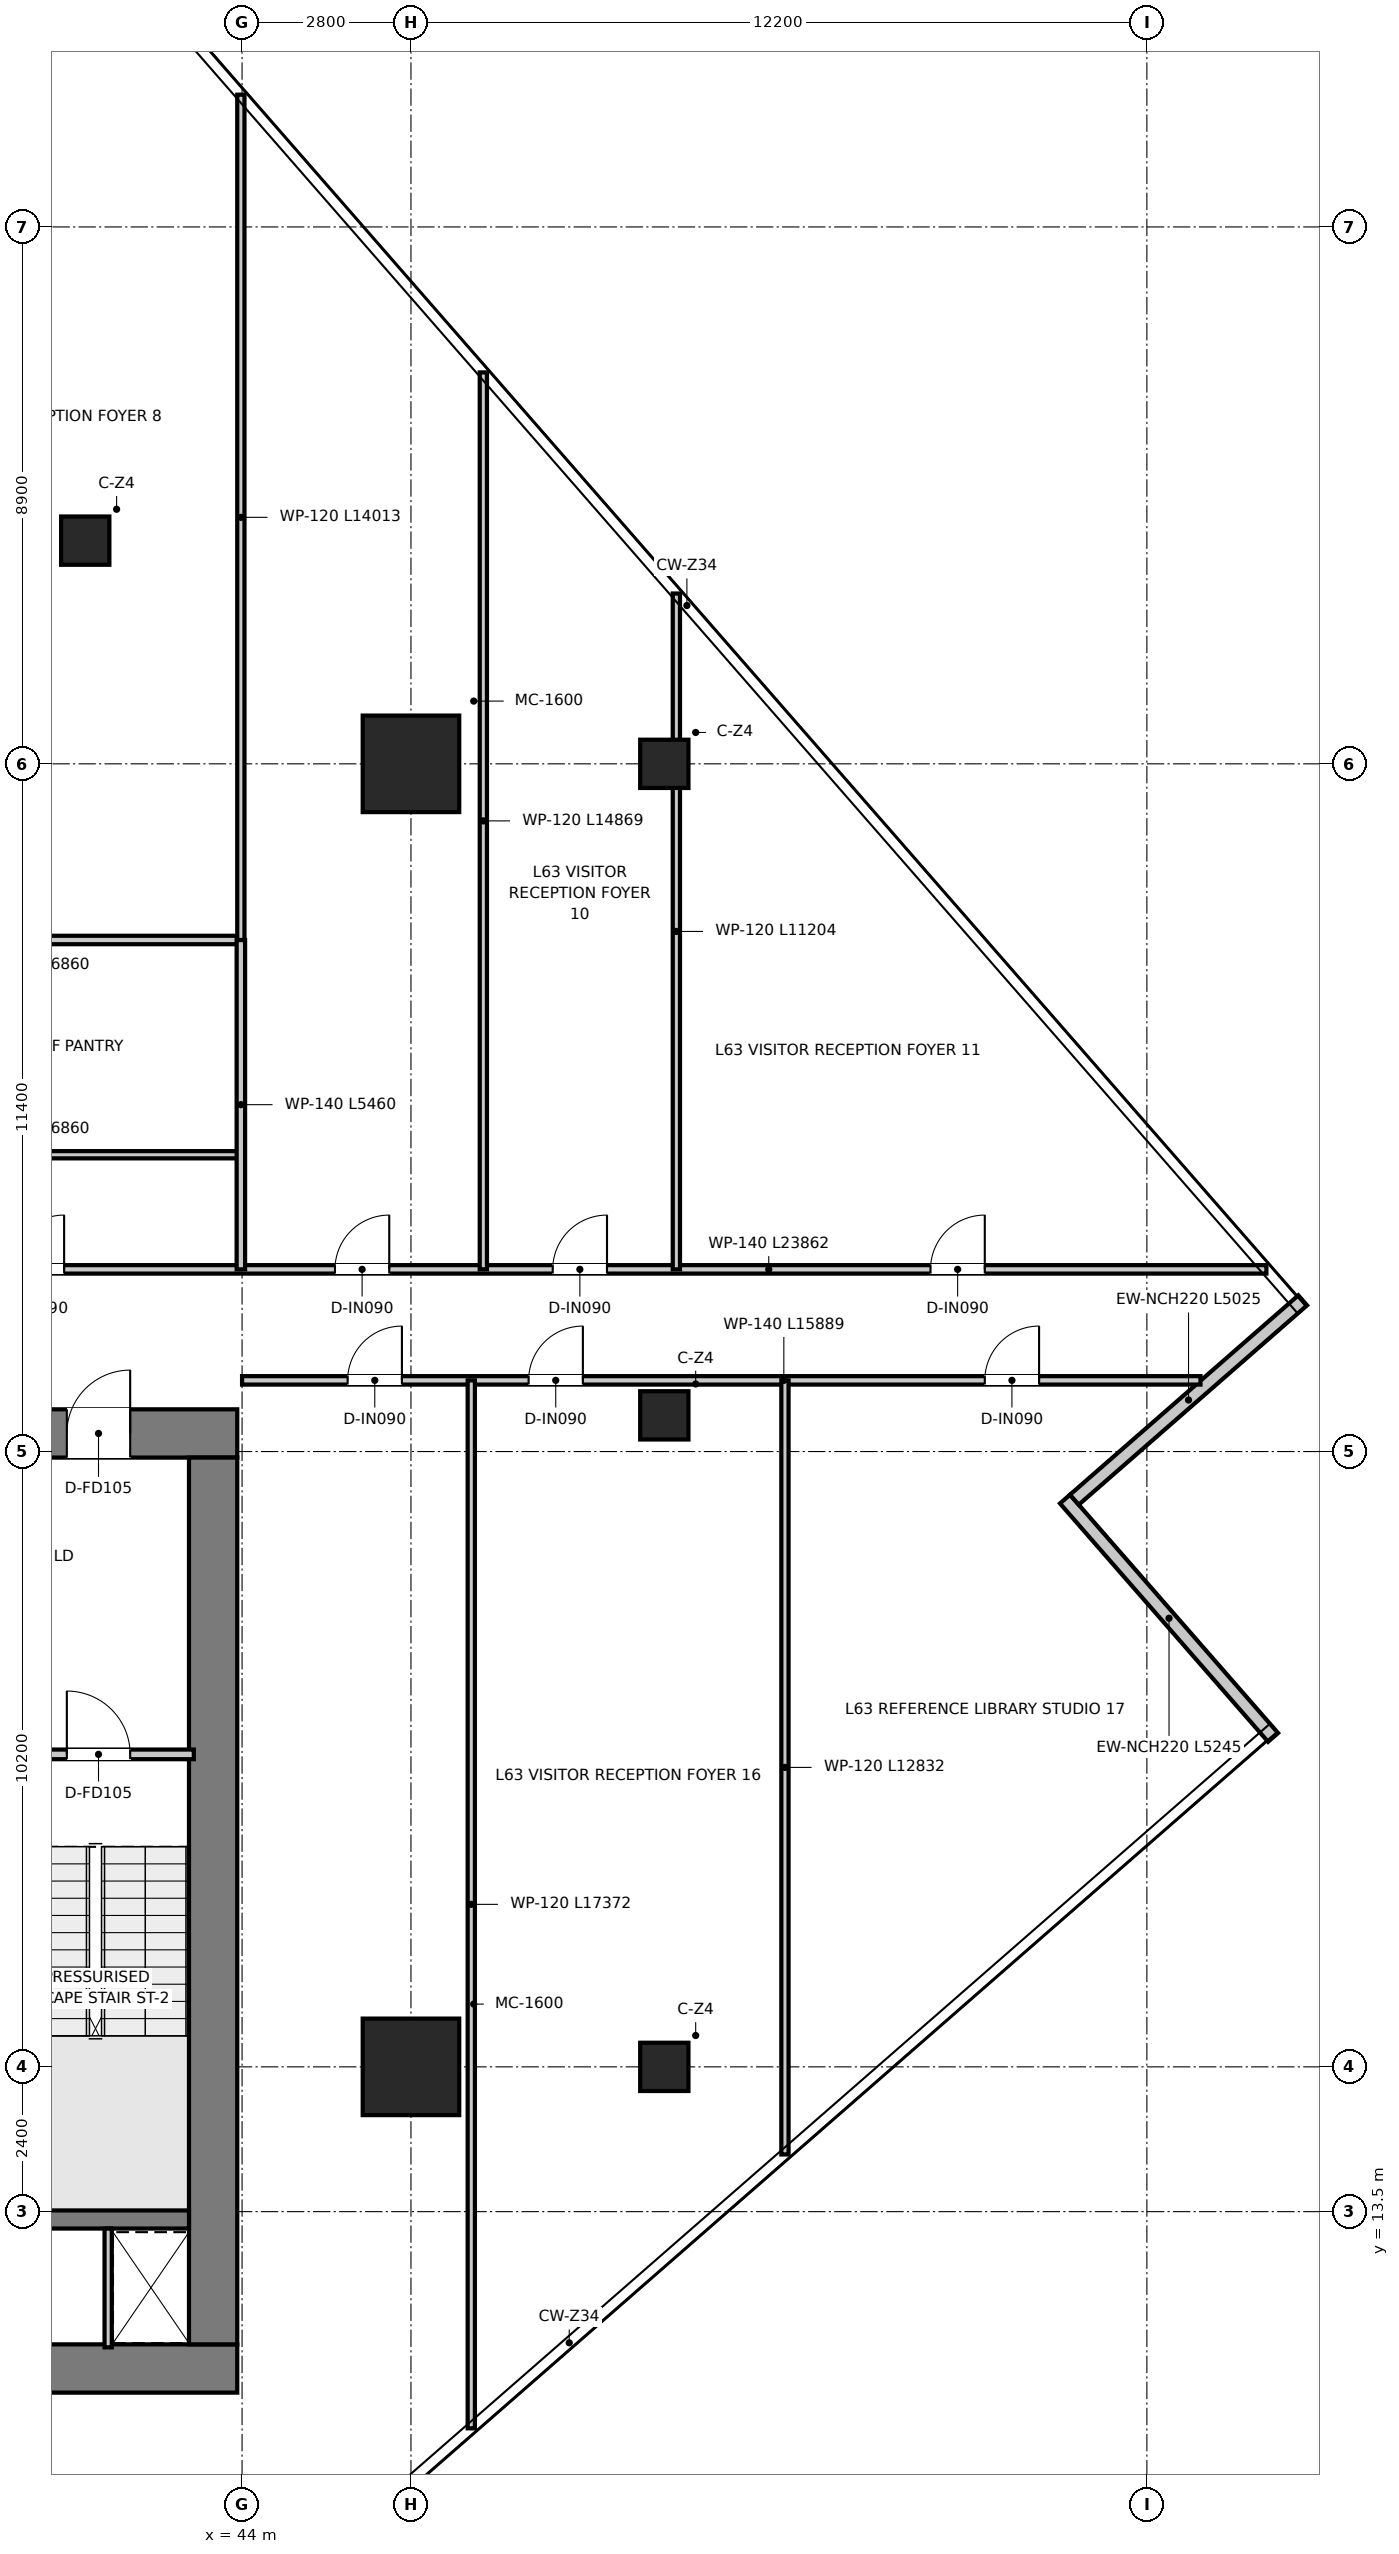
"""IFC4 building model, lengths in metres.
Left out: names, types, materials, properties, quantities, classifications, styles, units other than length and angle.
Written with IfcOpenShell. Run it as: python <this file> out.ifc"""

import sys

from ifc_helpers import new_model, si_unit, direction, frame, frame_2d, origin, origin_2d, place, context, subcontext, project, spatial, rectangle, extrude, source, transform, mapped, element, fill, save


model = new_model("IFC4")
c1 = context("Model", 3, precision=1e-05, world=origin(), true_north=direction((0.0, 1.0)))
c2 = subcontext(c1, "Body", "Model", "MODEL_VIEW")
j1 = project(units=[si_unit("LENGTHUNIT", "METRE"), si_unit("PLANEANGLEUNIT", "RADIAN")], contexts=[c1])
p1 = place(None, origin())
s1 = spatial("IfcSite", under=j1, at=p1, CompositionType="ELEMENT")
p2 = place(p1, origin())
s2 = spatial("IfcBuilding", under=s1, at=p2, CompositionType="ELEMENT")
p3 = place(p2, frame((0.0, 0.0, 258.65)))
s3 = spatial("IfcBuildingStorey", under=s2, at=p3, CompositionType="ELEMENT", Elevation=258.65)
p4 = place(p3, frame((28.08, 10.9, 0.0), z_axis=(0.0, 0.0, 1.0), x_axis=(1.0, 0.0, 0.0)))
e1 = element("IfcWall", 1, at=p4, inside=s3, PredefinedType="SHEAR", context=c2, shape_type="SweptSolid", body=[
    extrude(rectangle(XDim=15.84, YDim=0.8, at=frame_2d((7.92, 0.0))), origin(), (0.0, 0.0, 1.0), 3.95),
])
p5 = place(p3, frame((28.08, 26.4, 0.0), z_axis=(0.0, 0.0, 1.0), x_axis=(1.0, 0.0, 0.0)))
e2 = element("IfcWall", 2, at=p5, inside=s3, PredefinedType="SHEAR", context=c2, shape_type="SweptSolid", body=[
    extrude(rectangle(XDim=15.84, YDim=0.8, at=frame_2d((7.92, 0.0))), origin(), (0.0, 0.0, 1.0), 3.95),
])
p6 = place(p5, frame((7.22, 0.0, 0.0)))
e3 = element("IfcOpeningElement", 3, at=p6, cuts=e2, PredefinedType="OPENING", context=c2, shape_type="SweptSolid", body=[
    extrude(rectangle(XDim=1.4, YDim=2.2, at=frame_2d((0.7, 1.1))), frame((0.0, 0.41, 0.0), z_axis=(0.0, -1.0, 0.0), x_axis=(1.0, 0.0, 0.0)), (0.0, 0.0, 1.0), 0.82),
])
p7 = place(p5, frame((1.775, 0.0, 0.0)))
e4 = element("IfcOpeningElement", 4, at=p7, cuts=e2, PredefinedType="OPENING", context=c2, shape_type="SweptSolid", body=[
    extrude(rectangle(XDim=1.05, YDim=2.1, at=frame_2d((0.525, 1.05))), frame((0.0, 0.41, 0.0), z_axis=(0.0, -1.0, 0.0), x_axis=(1.0, 0.0, 0.0)), (0.0, 0.0, 1.0), 0.82),
])
p8 = place(p5, frame((13.015, 0.0, 0.0)))
e5 = element("IfcOpeningElement", 5, at=p8, cuts=e2, PredefinedType="OPENING", context=c2, shape_type="SweptSolid", body=[
    extrude(rectangle(XDim=1.05, YDim=2.1, at=frame_2d((0.525, 1.05))), frame((0.0, 0.41, 0.0), z_axis=(0.0, -1.0, 0.0), x_axis=(1.0, 0.0, 0.0)), (0.0, 0.0, 1.0), 0.82),
])
p9 = place(p3, frame((43.52, 11.3, 0.0), z_axis=(0.0, 0.0, 1.0), x_axis=(0.0, 1.0, 0.0)))
e6 = element("IfcWall", 6, at=p9, inside=s3, PredefinedType="SHEAR", context=c2, shape_type="SweptSolid", body=[
    extrude(rectangle(XDim=14.7, YDim=0.8, at=frame_2d((7.35, 0.0))), origin(), (0.0, 0.0, 1.0), 3.95),
])
p10 = place(p3, frame((40.02, 13.37, 0.0), z_axis=(0.0, 0.0, 1.0), x_axis=(1.0, 0.0, 0.0)))
e7 = element("IfcWall", 7, at=p10, inside=s3, PredefinedType="SHEAR", context=c2, shape_type="SweptSolid", body=[
    extrude(rectangle(XDim=3.1, YDim=0.3, at=frame_2d((1.55, 0.0))), origin(), (0.0, 0.0, 1.0), 3.95),
])
m1 = source(origin(), c2, "Body", "SweptSolid", [
    extrude(rectangle(XDim=1.6, YDim=1.6, at=origin_2d()), origin(), (0.0, 0.0, 1.0), 3.95),
])
for number, where, z_axis, x_axis in (
    (8, (46.8, 15.9, 0.0), (0.0, 0.0, 1.0), (1.0, 0.0, 0.0)),
    (9, (46.8, 37.5, 0.0), (0.0, 0.0, 1.0), (1.0, 0.0, 0.0)),
):
    element("IfcColumn", number, at=place(p3, frame(where, z_axis=z_axis, x_axis=x_axis)), inside=s3, PredefinedType="USERDEFINED", context=c2, shape_type="MappedRepresentation", body=[
        mapped(m1, transform((0.0, 0.0, 0.0), x_axis=(1.0, 0.0, 0.0), y_axis=(0.0, 1.0, 0.0), z_axis=(0.0, 0.0, 1.0), scale=1.0)),
    ])
m2 = source(origin(), c2, "Body", "SweptSolid", [
    extrude(rectangle(XDim=0.8, YDim=0.8, at=origin_2d()), origin(), (0.0, 0.0, 1.0), 3.95),
])
for number, where, z_axis, x_axis in (
    (10, (41.4, 41.2, 0.0), (0.0, 0.0, 1.0), (1.0, 0.0, 0.0)),
    (11, (51.0, 37.5, 0.0), (0.0, 0.0, 1.0), (1.0, 0.0, 0.0)),
    (12, (51.0, 26.7, 0.0), (0.0, 0.0, 1.0), (1.0, 0.0, 0.0)),
    (13, (51.0, 15.9, 0.0), (0.0, 0.0, 1.0), (1.0, 0.0, 0.0)),
):
    element("IfcColumn", number, at=place(p3, frame(where, z_axis=z_axis, x_axis=x_axis)), inside=s3, PredefinedType="COLUMN", context=c2, shape_type="MappedRepresentation", body=[
        mapped(m2, transform((0.0, 0.0, 0.0), x_axis=(1.0, 0.0, 0.0), y_axis=(0.0, 1.0, 0.0), z_axis=(0.0, 0.0, 1.0), scale=1.0)),
    ])
p11 = place(p3, frame((61.092, 21.361, 0.0), z_axis=(0.0, 0.0, 1.0), x_axis=(-0.657710057617, 0.7532711863, 0.0)))
e14 = element("IfcWall", 14, at=p11, inside=s3, PredefinedType="ELEMENTEDWALL", context=c2, shape_type="SweptSolid", body=[
    extrude(rectangle(XDim=5.245, YDim=0.22, at=frame_2d((2.623, 0.0))), origin(), (0.0, 0.0, 1.0), 3.6),
])
p12 = place(p3, frame((57.798, 25.302, 0.0), z_axis=(0.0, 0.0, 1.0), x_axis=(0.753274531518, 0.657706226339, 0.0)))
e15 = element("IfcWall", 15, at=p12, inside=s3, PredefinedType="ELEMENTEDWALL", context=c2, shape_type="SweptSolid", body=[
    extrude(rectangle(XDim=5.025, YDim=0.22, at=frame_2d((2.512, 0.0))), origin(), (0.0, 0.0, 1.0), 3.6),
])
p13 = place(p3, frame((41.339, 51.792, 0.0), z_axis=(0.0, 0.0, 1.0), x_axis=(-0.753268767402, -0.657712827955, 0.0)))
e16 = element("IfcWall", 16, at=p13, inside=s3, PredefinedType="ELEMENTEDWALL", context=c2, shape_type="SweptSolid", body=[
    extrude(rectangle(XDim=5.46, YDim=0.22, at=frame_2d((2.73, 0.0))), origin(), (0.0, 0.0, 1.0), 3.6),
])
p14 = place(p3, frame((40.04, 21.08, 0.0), z_axis=(0.0, 0.0, 1.0), x_axis=(1.0, 0.0, 0.0)))
e17 = element("IfcWall", 17, at=p14, inside=s3, PredefinedType="PARTITIONING", context=c2, shape_type="SweptSolid", body=[
    extrude(rectangle(XDim=3.16, YDim=0.16, at=frame_2d((1.58, 0.0))), origin(), (0.0, 0.0, 1.0), 3.6),
])
p15 = place(p14, frame((1.055, 0.0, 0.0)))
e18 = element("IfcOpeningElement", 18, at=p15, cuts=e17, PredefinedType="OPENING", context=c2, shape_type="SweptSolid", body=[
    extrude(rectangle(XDim=1.05, YDim=2.1, at=frame_2d((0.525, 1.05))), frame((0.0, 0.09, 0.0), z_axis=(0.0, -1.0, 0.0), x_axis=(1.0, 0.0, 0.0)), (0.0, 0.0, 1.0), 0.18),
])
p16 = place(p3, frame((41.78, 11.25, 0.0), z_axis=(0.0, 0.0, 1.0), x_axis=(0.0, 1.0, 0.0)))
e19 = element("IfcWall", 19, at=p16, inside=s3, PredefinedType="PARTITIONING", context=c2, shape_type="SweptSolid", body=[
    extrude(rectangle(XDim=1.97, YDim=0.12, at=frame_2d((0.985, 0.0))), origin(), (0.0, 0.0, 1.0), 3.6),
])
p17 = place(p3, frame((37.12, 29.12, 0.0), z_axis=(0.0, 0.0, 1.0), x_axis=(1.0, 0.0, 0.0)))
e20 = element("IfcWall", 20, at=p17, inside=s3, PredefinedType="PARTITIONING", context=c2, shape_type="SweptSolid", body=[
    extrude(rectangle(XDim=23.862, YDim=0.14, at=frame_2d((11.931, 0.0))), origin(), (0.0, 0.0, 1.0), 2.96),
])
p18 = place(p17, frame((3.03, 0.0, 0.0)))
e21 = element("IfcOpeningElement", 21, at=p18, cuts=e20, PredefinedType="OPENING", context=c2, shape_type="SweptSolid", body=[
    extrude(rectangle(XDim=0.9, YDim=2.1, at=frame_2d((0.45, 1.05))), frame((0.0, 0.08, 0.0), z_axis=(0.0, -1.0, 0.0), x_axis=(1.0, 0.0, 0.0)), (0.0, 0.0, 1.0), 0.16),
])
p19 = place(p17, frame((8.42, 0.0, 0.0)))
e22 = element("IfcOpeningElement", 22, at=p19, cuts=e20, PredefinedType="OPENING", context=c2, shape_type="SweptSolid", body=[
    extrude(rectangle(XDim=0.9, YDim=2.1, at=frame_2d((0.45, 1.05))), frame((0.0, 0.08, 0.0), z_axis=(0.0, -1.0, 0.0), x_axis=(1.0, 0.0, 0.0)), (0.0, 0.0, 1.0), 0.16),
])
p20 = place(p17, frame((12.03, 0.0, 0.0)))
e23 = element("IfcOpeningElement", 23, at=p20, cuts=e20, PredefinedType="OPENING", context=c2, shape_type="SweptSolid", body=[
    extrude(rectangle(XDim=0.9, YDim=2.1, at=frame_2d((0.45, 1.05))), frame((0.0, 0.08, 0.0), z_axis=(0.0, -1.0, 0.0), x_axis=(1.0, 0.0, 0.0)), (0.0, 0.0, 1.0), 0.16),
])
p21 = place(p17, frame((18.293, 0.0, 0.0)))
e24 = element("IfcOpeningElement", 24, at=p21, cuts=e20, PredefinedType="OPENING", context=c2, shape_type="SweptSolid", body=[
    extrude(rectangle(XDim=0.9, YDim=2.1, at=frame_2d((0.45, 1.05))), frame((0.0, 0.08, 0.0), z_axis=(0.0, -1.0, 0.0), x_axis=(1.0, 0.0, 0.0)), (0.0, 0.0, 1.0), 0.16),
])
p22 = place(p3, frame((44.0, 27.28, 0.0), z_axis=(0.0, 0.0, 1.0), x_axis=(1.0, 0.0, 0.0)))
e25 = element("IfcWall", 25, at=p22, inside=s3, PredefinedType="PARTITIONING", context=c2, shape_type="SweptSolid", body=[
    extrude(rectangle(XDim=15.889, YDim=0.14, at=frame_2d((7.944, 0.0))), origin(), (0.0, 0.0, 1.0), 2.96),
])
p23 = place(p22, frame((1.75, 0.0, 0.0)))
e26 = element("IfcOpeningElement", 26, at=p23, cuts=e25, PredefinedType="OPENING", context=c2, shape_type="SweptSolid", body=[
    extrude(rectangle(XDim=0.9, YDim=2.1, at=frame_2d((0.45, 1.05))), frame((0.0, 0.08, 0.0), z_axis=(0.0, -1.0, 0.0), x_axis=(1.0, 0.0, 0.0)), (0.0, 0.0, 1.0), 0.16),
])
p24 = place(p22, frame((4.75, 0.0, 0.0)))
e27 = element("IfcOpeningElement", 27, at=p24, cuts=e25, PredefinedType="OPENING", context=c2, shape_type="SweptSolid", body=[
    extrude(rectangle(XDim=0.9, YDim=2.1, at=frame_2d((0.45, 1.05))), frame((0.0, 0.08, 0.0), z_axis=(0.0, -1.0, 0.0), x_axis=(1.0, 0.0, 0.0)), (0.0, 0.0, 1.0), 0.16),
])
p25 = place(p22, frame((12.313, 0.0, 0.0)))
e28 = element("IfcOpeningElement", 28, at=p25, cuts=e25, PredefinedType="OPENING", context=c2, shape_type="SweptSolid", body=[
    extrude(rectangle(XDim=0.9, YDim=2.1, at=frame_2d((0.45, 1.05))), frame((0.0, 0.08, 0.0), z_axis=(0.0, -1.0, 0.0), x_axis=(1.0, 0.0, 0.0)), (0.0, 0.0, 1.0), 0.16),
])
p26 = place(p3, frame((37.12, 31.02, 0.0), z_axis=(0.0, 0.0, 1.0), x_axis=(1.0, 0.0, 0.0)))
e29 = element("IfcWall", 29, at=p26, inside=s3, PredefinedType="PARTITIONING", context=c2, shape_type="SweptSolid", body=[
    extrude(rectangle(XDim=6.86, YDim=0.12, at=frame_2d((3.43, 0.0))), origin(), (0.0, 0.0, 1.0), 3.11),
])
p27 = place(p3, frame((37.12, 34.58, 0.0), z_axis=(0.0, 0.0, 1.0), x_axis=(1.0, 0.0, 0.0)))
e30 = element("IfcWall", 30, at=p27, inside=s3, PredefinedType="PARTITIONING", context=c2, shape_type="SweptSolid", body=[
    extrude(rectangle(XDim=6.86, YDim=0.14, at=frame_2d((3.43, 0.0))), origin(), (0.0, 0.0, 1.0), 3.11),
])
p28 = place(p3, frame((43.98, 29.12, 0.0), z_axis=(0.0, 0.0, 1.0), x_axis=(0.0, 1.0, 0.0)))
e31 = element("IfcWall", 31, at=p28, inside=s3, PredefinedType="PARTITIONING", context=c2, shape_type="SweptSolid", body=[
    extrude(rectangle(XDim=5.46, YDim=0.14, at=frame_2d((2.73, 0.0))), origin(), (0.0, 0.0, 1.0), 3.3),
])
p29 = place(p3, frame((43.98, 34.58, 0.0), z_axis=(0.0, 0.0, 1.0), x_axis=(0.0, 1.0, 0.0)))
e32 = element("IfcWall", 32, at=p29, inside=s3, PredefinedType="PARTITIONING", context=c2, shape_type="SweptSolid", body=[
    extrude(rectangle(XDim=14.012, YDim=0.12, at=frame_2d((7.006, 0.0))), origin(), (0.0, 0.0, 1.0), 2.96),
])
p30 = place(p3, frame((48.0, 29.12, 0.0), z_axis=(0.0, 0.0, 1.0), x_axis=(0.0, 1.0, 0.0)))
e33 = element("IfcWall", 33, at=p30, inside=s3, PredefinedType="PARTITIONING", context=c2, shape_type="SweptSolid", body=[
    extrude(rectangle(XDim=14.868, YDim=0.12, at=frame_2d((7.434, 0.0))), origin(), (0.0, 0.0, 1.0), 3.11),
])
p31 = place(p3, frame((51.2, 29.12, 0.0), z_axis=(0.0, 0.0, 1.0), x_axis=(0.0, 1.0, 0.0)))
e34 = element("IfcWall", 34, at=p31, inside=s3, PredefinedType="PARTITIONING", context=c2, shape_type="SweptSolid", body=[
    extrude(rectangle(XDim=11.203, YDim=0.12, at=frame_2d((5.602, 0.0))), origin(), (0.0, 0.0, 1.0), 3.21),
])
p32 = place(p3, frame((47.8, 9.908, 0.0), z_axis=(0.0, 0.0, 1.0), x_axis=(0.0, 1.0, 0.0)))
e35 = element("IfcWall", 35, at=p32, inside=s3, PredefinedType="PARTITIONING", context=c2, shape_type="SweptSolid", body=[
    extrude(rectangle(XDim=17.372, YDim=0.12, at=frame_2d((8.686, 0.0))), origin(), (0.0, 0.0, 1.0), 3.11),
])
p33 = place(p3, frame((53.0, 14.448, 0.0), z_axis=(0.0, 0.0, 1.0), x_axis=(0.0, 1.0, 0.0)))
e36 = element("IfcWall", 36, at=p33, inside=s3, PredefinedType="PARTITIONING", context=c2, shape_type="SweptSolid", body=[
    extrude(rectangle(XDim=12.832, YDim=0.12, at=frame_2d((6.416, 0.0))), origin(), (0.0, 0.0, 1.0), 3.6),
])
p34 = place(p15, origin())
e37 = element("IfcDoor", 37, at=p34, inside=s3, OperationType="SINGLE_SWING_LEFT", PredefinedType="DOOR", context=c2, shape_type="SweptSolid", body=[
    extrude(rectangle(XDim=1.05, YDim=2.1, at=frame_2d((0.525, 1.05))), frame((0.0, 0.025, 0.0), z_axis=(0.0, -1.0, 0.0), x_axis=(1.0, 0.0, 0.0)), (0.0, 0.0, 1.0), 0.05),
])
fill(e18, e37)
p35 = place(p8, origin())
e38 = element("IfcDoor", 38, at=p35, inside=s3, OperationType="SINGLE_SWING_RIGHT", PredefinedType="DOOR", context=c2, shape_type="SweptSolid", body=[
    extrude(rectangle(XDim=1.05, YDim=2.1, at=frame_2d((0.525, 1.05))), frame((0.0, 0.025, 0.0), z_axis=(0.0, -1.0, 0.0), x_axis=(1.0, 0.0, 0.0)), (0.0, 0.0, 1.0), 0.05),
])
fill(e5, e38)
p36 = place(p18, origin())
e39 = element("IfcDoor", 39, at=p36, inside=s3, OperationType="SINGLE_SWING_RIGHT", PredefinedType="DOOR", context=c2, shape_type="SweptSolid", body=[
    extrude(rectangle(XDim=0.9, YDim=2.1, at=frame_2d((0.45, 1.05))), frame((0.0, 0.025, 0.0), z_axis=(0.0, -1.0, 0.0), x_axis=(1.0, 0.0, 0.0)), (0.0, 0.0, 1.0), 0.05),
])
fill(e21, e39)
p37 = place(p19, origin())
e40 = element("IfcDoor", 40, at=p37, inside=s3, OperationType="SINGLE_SWING_RIGHT", PredefinedType="DOOR", context=c2, shape_type="SweptSolid", body=[
    extrude(rectangle(XDim=0.9, YDim=2.1, at=frame_2d((0.45, 1.05))), frame((0.0, 0.025, 0.0), z_axis=(0.0, -1.0, 0.0), x_axis=(1.0, 0.0, 0.0)), (0.0, 0.0, 1.0), 0.05),
])
fill(e22, e40)
p38 = place(p20, origin())
e41 = element("IfcDoor", 41, at=p38, inside=s3, OperationType="SINGLE_SWING_RIGHT", PredefinedType="DOOR", context=c2, shape_type="SweptSolid", body=[
    extrude(rectangle(XDim=0.9, YDim=2.1, at=frame_2d((0.45, 1.05))), frame((0.0, 0.025, 0.0), z_axis=(0.0, -1.0, 0.0), x_axis=(1.0, 0.0, 0.0)), (0.0, 0.0, 1.0), 0.05),
])
fill(e23, e41)
p39 = place(p21, origin())
e42 = element("IfcDoor", 42, at=p39, inside=s3, OperationType="SINGLE_SWING_RIGHT", PredefinedType="DOOR", context=c2, shape_type="SweptSolid", body=[
    extrude(rectangle(XDim=0.9, YDim=2.1, at=frame_2d((0.45, 1.05))), frame((0.0, 0.025, 0.0), z_axis=(0.0, -1.0, 0.0), x_axis=(1.0, 0.0, 0.0)), (0.0, 0.0, 1.0), 0.05),
])
fill(e24, e42)
p40 = place(p23, origin())
e43 = element("IfcDoor", 43, at=p40, inside=s3, OperationType="SINGLE_SWING_RIGHT", PredefinedType="DOOR", context=c2, shape_type="SweptSolid", body=[
    extrude(rectangle(XDim=0.9, YDim=2.1, at=frame_2d((0.45, 1.05))), frame((0.0, 0.025, 0.0), z_axis=(0.0, -1.0, 0.0), x_axis=(1.0, 0.0, 0.0)), (0.0, 0.0, 1.0), 0.05),
])
fill(e26, e43)
p41 = place(p24, origin())
e44 = element("IfcDoor", 44, at=p41, inside=s3, OperationType="SINGLE_SWING_RIGHT", PredefinedType="DOOR", context=c2, shape_type="SweptSolid", body=[
    extrude(rectangle(XDim=0.9, YDim=2.1, at=frame_2d((0.45, 1.05))), frame((0.0, 0.025, 0.0), z_axis=(0.0, -1.0, 0.0), x_axis=(1.0, 0.0, 0.0)), (0.0, 0.0, 1.0), 0.05),
])
fill(e27, e44)
p42 = place(p25, origin())
e45 = element("IfcDoor", 45, at=p42, inside=s3, OperationType="SINGLE_SWING_RIGHT", PredefinedType="DOOR", context=c2, shape_type="SweptSolid", body=[
    extrude(rectangle(XDim=0.9, YDim=2.1, at=frame_2d((0.45, 1.05))), frame((0.0, 0.025, 0.0), z_axis=(0.0, -1.0, 0.0), x_axis=(1.0, 0.0, 0.0)), (0.0, 0.0, 1.0), 0.05),
])
fill(e28, e45)
save(model, sys.argv[1])
